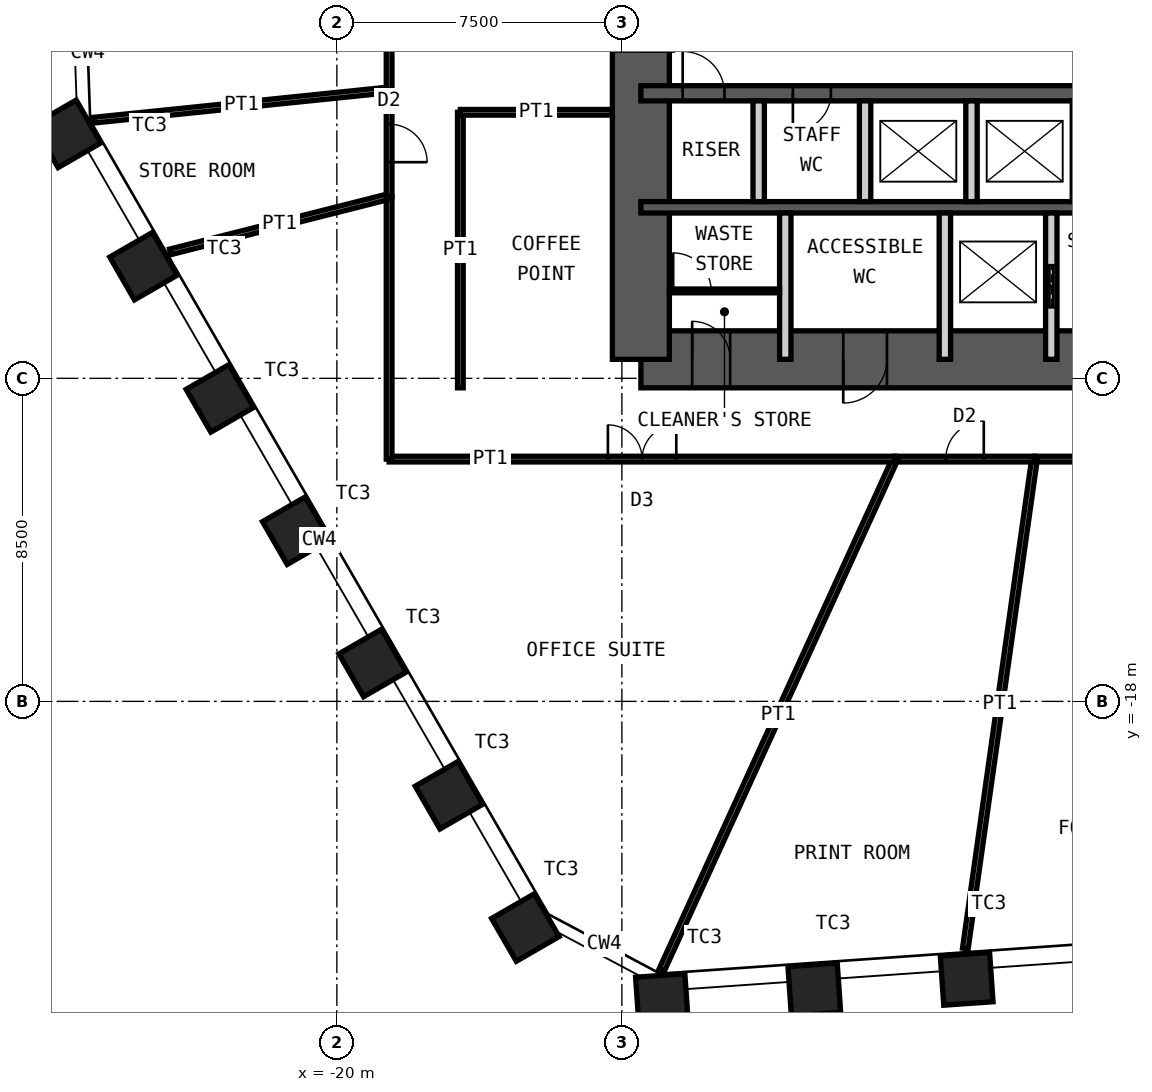
"""IFC4 building model, lengths in metres.
Left out: names, types, materials, properties, quantities, classifications, styles, units other than length and angle.
Written with IfcOpenShell. Run it as: python <this file> out.ifc"""

import sys

from ifc_helpers import new_model, si_unit, direction, frame, frame_2d, origin, origin_2d, place, context, subcontext, project, spatial, rectangle, hollow_rectangle, extrude, element, fill, save


model = new_model("IFC4")
c1 = context("Model", 3, precision=1e-05, world=origin(), true_north=direction((0.0, 1.0)))
c2 = subcontext(c1, "Body", "Model", "MODEL_VIEW")
j1 = project(units=[si_unit("LENGTHUNIT", "METRE"), si_unit("PLANEANGLEUNIT", "RADIAN")], contexts=[c1])
p1 = place(None, origin())
s1 = spatial("IfcSite", under=j1, at=p1, CompositionType="ELEMENT")
p2 = place(p1, origin())
s2 = spatial("IfcBuilding", under=s1, at=p2, CompositionType="ELEMENT")
p3 = place(p2, frame((0.0, 0.0, 119.8)))
s3 = spatial("IfcBuildingStorey", under=s2, at=p3, CompositionType="ELEMENT", Elevation=119.8)
for number, where, z_axis, x_axis in (
    (1, (-3.427, -25.301, 0.0), (0.0, 0.0, 1.0), (0.998, 0.07, 0.0)),
    (2, (-7.436, -25.581, 0.0), (0.0, 0.0, 1.0), (0.998, 0.07, 0.0)),
    (3, (-11.446, -25.861, 0.0), (0.0, 0.0, 1.0), (0.998, 0.07, 0.0)),
    (4, (-15.04, -23.95, 0.0), (0.0, 0.0, 1.0), (0.5, -0.866, 0.0)),
    (5, (-17.049, -20.47, 0.0), (0.0, 0.0, 1.0), (0.5, -0.866, 0.0)),
    (6, (-19.059, -16.989, 0.0), (0.0, 0.0, 1.0), (0.5, -0.866, 0.0)),
    (7, (-21.068, -13.509, 0.0), (0.0, 0.0, 1.0), (0.5, -0.866, 0.0)),
    (8, (-23.078, -10.028, 0.0), (0.0, 0.0, 1.0), (0.5, -0.866, 0.0)),
    (9, (-25.087, -6.547, 0.0), (0.0, 0.0, 1.0), (0.5, -0.866, 0.0)),
    (10, (-27.097, -3.067, 0.0), (0.0, 0.0, 1.0), (0.5, -0.866, 0.0)),
):
    element("IfcColumn", number, at=place(p3, frame(where, z_axis=z_axis, x_axis=x_axis)), inside=s3, PredefinedType="COLUMN", context=c2, shape_type="SweptSolid", body=[
        extrude(hollow_rectangle(XDim=1.3, YDim=1.3, WallThickness=0.1, at=origin_2d()), origin(), (0.0, 0.0, 1.0), 4.2),
    ])
p4 = place(p3, frame((-12.0, -9.0, 0.0), z_axis=(0.0, 0.0, 1.0), x_axis=(1.0, 0.0, 0.0)))
e11 = element("IfcWall", 11, at=p4, inside=s3, PredefinedType="SHEAR", context=c2, shape_type="SweptSolid", body=[
    extrude(rectangle(XDim=24.0, YDim=1.5, at=frame_2d((12.0, 0.0))), origin(), (0.0, 0.0, 1.0), 4.2),
])
p5 = place(p4, frame((1.35, 0.0, 0.0)))
e12 = element("IfcOpeningElement", 12, at=p5, cuts=e11, PredefinedType="OPENING", context=c2, shape_type="SweptSolid", body=[
    extrude(rectangle(XDim=1.0, YDim=2.1, at=frame_2d((0.5, 1.05))), frame((0.0, 0.76, 0.0), z_axis=(0.0, -1.0, 0.0), x_axis=(1.0, 0.0, 0.0)), (0.0, 0.0, 1.0), 1.52),
])
p6 = place(p4, frame((5.325, 0.0, 0.0)))
e13 = element("IfcOpeningElement", 13, at=p6, cuts=e11, PredefinedType="OPENING", context=c2, shape_type="SweptSolid", body=[
    extrude(rectangle(XDim=1.15, YDim=2.1, at=frame_2d((0.575, 1.05))), frame((0.0, 0.76, 0.0), z_axis=(0.0, -1.0, 0.0), x_axis=(1.0, 0.0, 0.0)), (0.0, 0.0, 1.0), 1.52),
])
p7 = place(p4, frame((12.6, 0.0, 0.0)))
e14 = element("IfcOpeningElement", 14, at=p7, cuts=e11, PredefinedType="OPENING", context=c2, shape_type="SweptSolid", body=[
    extrude(rectangle(XDim=1.0, YDim=2.1, at=frame_2d((0.5, 1.05))), frame((0.0, 0.76, 0.0), z_axis=(0.0, -1.0, 0.0), x_axis=(1.0, 0.0, 0.0)), (0.0, 0.0, 1.0), 1.52),
])
p8 = place(p3, frame((-12.0, -9.0, 0.0), z_axis=(0.0, 0.0, 1.0), x_axis=(0.0, 1.0, 0.0)))
e15 = element("IfcWall", 15, at=p8, inside=s3, PredefinedType="SHEAR", context=c2, shape_type="SweptSolid", body=[
    extrude(rectangle(XDim=18.0, YDim=1.5, at=frame_2d((9.0, 0.0))), origin(), (0.0, 0.0, 1.0), 4.2),
])
p9 = place(p8, frame((8.1, 0.0, 0.0)))
e16 = element("IfcOpeningElement", 16, at=p9, cuts=e15, PredefinedType="OPENING", context=c2, shape_type="SweptSolid", body=[
    extrude(rectangle(XDim=1.8, YDim=2.1, at=frame_2d((0.9, 1.05))), frame((0.0, 0.76, 0.0), z_axis=(0.0, -1.0, 0.0), x_axis=(1.0, 0.0, 0.0)), (0.0, 0.0, 1.0), 1.52),
])
p10 = place(p3, frame((-12.0, -2.0, 0.0), z_axis=(0.0, 0.0, 1.0), x_axis=(1.0, 0.0, 0.0)))
e17 = element("IfcWall", 17, at=p10, inside=s3, PredefinedType="SHEAR", context=c2, shape_type="SweptSolid", body=[
    extrude(rectangle(XDim=24.0, YDim=0.4, at=frame_2d((12.0, 0.0))), origin(), (0.0, 0.0, 1.0), 4.2),
])
p11 = place(p10, frame((1.1, 0.0, 0.0)))
e18 = element("IfcOpeningElement", 18, at=p11, cuts=e17, PredefinedType="OPENING", context=c2, shape_type="SweptSolid", body=[
    extrude(rectangle(XDim=1.1, YDim=2.1, at=frame_2d((0.55, 1.05))), frame((0.0, 0.21, 0.0), z_axis=(0.0, -1.0, 0.0), x_axis=(1.0, 0.0, 0.0)), (0.0, 0.0, 1.0), 0.42),
])
p12 = place(p10, frame((13.55, 0.0, 0.0)))
e19 = element("IfcOpeningElement", 19, at=p12, cuts=e17, PredefinedType="OPENING", context=c2, shape_type="SweptSolid", body=[
    extrude(rectangle(XDim=1.1, YDim=2.1, at=frame_2d((0.55, 1.05))), frame((0.0, 0.21, 0.0), z_axis=(0.0, -1.0, 0.0), x_axis=(1.0, 0.0, 0.0)), (0.0, 0.0, 1.0), 0.42),
])
p13 = place(p10, frame((20.7, 0.0, 0.0)))
e20 = element("IfcOpeningElement", 20, at=p13, cuts=e17, PredefinedType="OPENING", context=c2, shape_type="SweptSolid", body=[
    extrude(rectangle(XDim=1.1, YDim=2.1, at=frame_2d((0.55, 1.05))), frame((0.0, 0.21, 0.0), z_axis=(0.0, -1.0, 0.0), x_axis=(1.0, 0.0, 0.0)), (0.0, 0.0, 1.0), 0.42),
])
p14 = place(p10, frame((4.0, 0.0, 0.0)))
e21 = element("IfcOpeningElement", 21, at=p14, cuts=e17, PredefinedType="OPENING", context=c2, shape_type="SweptSolid", body=[
    extrude(rectangle(XDim=1.0, YDim=2.1, at=frame_2d((0.5, 1.05))), frame((0.0, 0.21, 0.0), z_axis=(0.0, -1.0, 0.0), x_axis=(1.0, 0.0, 0.0)), (0.0, 0.0, 1.0), 0.42),
])
p15 = place(p3, frame((-12.0, -5.0, 0.0), z_axis=(0.0, 0.0, 1.0), x_axis=(1.0, 0.0, 0.0)))
e22 = element("IfcWall", 22, at=p15, inside=s3, PredefinedType="SHEAR", context=c2, shape_type="SweptSolid", body=[
    extrude(rectangle(XDim=24.0, YDim=0.3, at=frame_2d((12.0, 0.0))), origin(), (0.0, 0.0, 1.0), 4.2),
])
for number, where, z_axis, x_axis in (
    (23, (-8.9, -4.85, 0.0), (0.0, 0.0, 1.0), (0.0, 1.0, 0.0)),
    (24, (-6.1, -4.85, 0.0), (0.0, 0.0, 1.0), (0.0, 1.0, 0.0)),
    (25, (-3.3, -4.85, 0.0), (0.0, 0.0, 1.0), (0.0, 1.0, 0.0)),
    (26, (-0.5, -4.85, 0.0), (0.0, 0.0, 1.0), (0.0, 1.0, 0.0)),
):
    element("IfcWall", number, at=place(p3, frame(where, z_axis=z_axis, x_axis=x_axis)), inside=s3, PredefinedType="PARTITIONING", context=c2, shape_type="SweptSolid", body=[
        extrude(rectangle(XDim=2.65, YDim=0.3, at=frame_2d((1.325, 0.0))), origin(), (0.0, 0.0, 1.0), 3.98),
    ])
for number, where, z_axis, x_axis in (
    (27, (-8.2, -9.0, 0.0), (0.0, 0.0, 1.0), (0.0, 1.0, 0.0)),
    (28, (-4.0, -9.0, 0.0), (0.0, 0.0, 1.0), (0.0, 1.0, 0.0)),
):
    element("IfcWall", number, at=place(p3, frame(where, z_axis=z_axis, x_axis=x_axis)), inside=s3, PredefinedType="PARTITIONING", context=c2, shape_type="SweptSolid", body=[
        extrude(rectangle(XDim=3.85, YDim=0.3, at=frame_2d((1.925, 0.0))), origin(), (0.0, 0.0, 1.0), 3.98),
    ])
p16 = place(p3, frame((-1.2, -9.0, 0.0), z_axis=(0.0, 0.0, 1.0), x_axis=(0.0, 1.0, 0.0)))
e29 = element("IfcWall", 29, at=p16, inside=s3, PredefinedType="PARTITIONING", context=c2, shape_type="SweptSolid", body=[
    extrude(rectangle(XDim=3.85, YDim=0.3, at=frame_2d((1.925, 0.0))), origin(), (0.0, 0.0, 1.0), 3.98),
])
p17 = place(p16, frame((1.375, 0.0, 0.0)))
e30 = element("IfcOpeningElement", 30, at=p17, cuts=e29, PredefinedType="OPENING", context=c2, shape_type="SweptSolid", body=[
    extrude(rectangle(XDim=1.1, YDim=2.4, at=frame_2d((0.55, 1.2))), frame((0.0, 0.16, 0.0), z_axis=(0.0, -1.0, 0.0), x_axis=(1.0, 0.0, 0.0)), (0.0, 0.0, 1.0), 0.32),
])
p18 = place(p3, frame((-11.25, -7.2, 0.0), z_axis=(0.0, 0.0, 1.0), x_axis=(1.0, 0.0, 0.0)))
e31 = element("IfcWall", 31, at=p18, inside=s3, PredefinedType="PARTITIONING", context=c2, shape_type="SweptSolid", body=[
    extrude(rectangle(XDim=2.9, YDim=0.1, at=frame_2d((1.45, 0.0))), origin(), (0.0, 0.0, 1.0), 3.98),
])
p19 = place(p18, frame((0.1, 0.0, 0.0)))
e32 = element("IfcOpeningElement", 32, at=p19, cuts=e31, PredefinedType="OPENING", context=c2, shape_type="SweptSolid", body=[
    extrude(rectangle(XDim=1.0, YDim=2.4, at=frame_2d((0.5, 1.2))), frame((0.0, 0.06, 0.0), z_axis=(0.0, -1.0, 0.0), x_axis=(1.0, 0.0, 0.0)), (0.0, 0.0, 1.0), 0.12),
])
p20 = place(p3, frame((2.197, -11.625, 0.0), z_axis=(0.0, 0.0, 1.0), x_axis=(-1.0, 0.0, 0.0)))
e33 = element("IfcWall", 33, at=p20, inside=s3, PredefinedType="PARTITIONING", context=c2, shape_type="SweptSolid", body=[
    extrude(rectangle(XDim=3.839, YDim=0.15, at=frame_2d((1.919, 0.0))), origin(), (0.0, 0.0, 1.0), 4.03),
])
p21 = place(p20, frame((1.419, 0.0, 0.0)))
e34 = element("IfcOpeningElement", 34, at=p21, cuts=e33, PredefinedType="OPENING", context=c2, shape_type="SweptSolid", body=[
    extrude(rectangle(XDim=1.0, YDim=2.4, at=frame_2d((0.5, 1.2))), frame((0.0, 0.085, 0.0), z_axis=(0.0, -1.0, 0.0), x_axis=(1.0, 0.0, 0.0)), (0.0, 0.0, 1.0), 0.17),
])
p22 = place(p3, frame((-3.462, -24.503, 0.0), z_axis=(0.0, 0.0, 1.0), x_axis=(0.139899618934, 0.990165691499, 0.0)))
e35 = element("IfcWall", 35, at=p22, inside=s3, PredefinedType="PARTITIONING", context=c2, shape_type="SweptSolid", body=[
    extrude(rectangle(XDim=13.006, YDim=0.15, at=frame_2d((6.503, 0.0))), origin(), (0.0, 0.0, 1.0), 3.33),
])
p23 = place(p3, frame((-1.642, -11.625, 0.0), z_axis=(0.0, 0.0, 1.0), x_axis=(-1.0, 0.0, 0.0)))
e36 = element("IfcWall", 36, at=p23, inside=s3, PredefinedType="PARTITIONING", context=c2, shape_type="SweptSolid", body=[
    extrude(rectangle(XDim=3.668, YDim=0.15, at=frame_2d((1.834, 0.0))), origin(), (0.0, 0.0, 1.0), 4.03),
])
p24 = place(p23, frame((1.334, 0.0, 0.0)))
e37 = element("IfcOpeningElement", 37, at=p24, cuts=e36, PredefinedType="OPENING", context=c2, shape_type="SweptSolid", body=[
    extrude(rectangle(XDim=1.0, YDim=2.4, at=frame_2d((0.5, 1.2))), frame((0.0, 0.085, 0.0), z_axis=(0.0, -1.0, 0.0), x_axis=(1.0, 0.0, 0.0)), (0.0, 0.0, 1.0), 0.17),
])
p25 = place(p3, frame((-11.453, -25.072, 0.0), z_axis=(0.0, 0.0, 1.0), x_axis=(0.415494357555, 0.909595755729, 0.0)))
e38 = element("IfcWall", 38, at=p25, inside=s3, PredefinedType="PARTITIONING", context=c2, shape_type="SweptSolid", body=[
    extrude(rectangle(XDim=14.784, YDim=0.15, at=frame_2d((7.392, 0.0))), origin(), (0.0, 0.0, 1.0), 2.93),
])
p26 = place(p3, frame((-5.31, -11.625, 0.0), z_axis=(0.0, 0.0, 1.0), x_axis=(-1.0, 0.0, 0.0)))
e39 = element("IfcWall", 39, at=p26, inside=s3, PredefinedType="PARTITIONING", context=c2, shape_type="SweptSolid", body=[
    extrude(rectangle(XDim=13.315, YDim=0.15, at=frame_2d((6.657, 0.0))), origin(), (0.0, 0.0, 1.0), 4.03),
])
p27 = place(p26, frame((5.757, 0.0, 0.0)))
e40 = element("IfcOpeningElement", 40, at=p27, cuts=e39, PredefinedType="OPENING", context=c2, shape_type="SweptSolid", body=[
    extrude(rectangle(XDim=1.8, YDim=2.4, at=frame_2d((0.9, 1.2))), frame((0.0, 0.085, 0.0), z_axis=(0.0, -1.0, 0.0), x_axis=(1.0, 0.0, 0.0)), (0.0, 0.0, 1.0), 0.17),
])
p28 = place(p3, frame((-18.625, -11.625, 0.0), z_axis=(0.0, 0.0, 1.0), x_axis=(0.0, 1.0, 0.0)))
e41 = element("IfcWall", 41, at=p28, inside=s3, PredefinedType="PARTITIONING", context=c2, shape_type="SweptSolid", body=[
    extrude(rectangle(XDim=6.91, YDim=0.15, at=frame_2d((3.455, 0.0))), origin(), (0.0, 0.0, 1.0), 4.03),
])
p29 = place(p3, frame((-24.384, -6.173, 0.0), z_axis=(0.0, 0.0, 1.0), x_axis=(0.969427635767, 0.245377380804, 0.0)))
e42 = element("IfcWall", 42, at=p29, inside=s3, PredefinedType="PARTITIONING", context=c2, shape_type="SweptSolid", body=[
    extrude(rectangle(XDim=5.941, YDim=0.15, at=frame_2d((2.97, 0.0))), origin(), (0.0, 0.0, 1.0), 3.33),
])
p30 = place(p3, frame((-18.625, -4.715, 0.0), z_axis=(0.0, 0.0, 1.0), x_axis=(0.0, 1.0, 0.0)))
e43 = element("IfcWall", 43, at=p30, inside=s3, PredefinedType="PARTITIONING", context=c2, shape_type="SweptSolid", body=[
    extrude(rectangle(XDim=2.805, YDim=0.15, at=frame_2d((1.402, 0.0))), origin(), (0.0, 0.0, 1.0), 4.03),
])
p31 = place(p30, frame((0.902, 0.0, 0.0)))
e44 = element("IfcOpeningElement", 44, at=p31, cuts=e43, PredefinedType="OPENING", context=c2, shape_type="SweptSolid", body=[
    extrude(rectangle(XDim=1.0, YDim=2.4, at=frame_2d((0.5, 1.2))), frame((0.0, 0.085, 0.0), z_axis=(0.0, -1.0, 0.0), x_axis=(1.0, 0.0, 0.0)), (0.0, 0.0, 1.0), 0.17),
])
p32 = place(p3, frame((-26.391, -2.706, 0.0), z_axis=(0.0, 0.0, 1.0), x_axis=(0.994783554373, 0.10200823471, 0.0)))
e45 = element("IfcWall", 45, at=p32, inside=s3, PredefinedType="PARTITIONING", context=c2, shape_type="SweptSolid", body=[
    extrude(rectangle(XDim=7.807, YDim=0.15, at=frame_2d((3.904, 0.0))), origin(), (0.0, 0.0, 1.0), 2.93),
])
p33 = place(p3, frame((-18.625, -1.91, 0.0), z_axis=(0.0, 0.0, 1.0), x_axis=(0.0, 1.0, 0.0)))
e46 = element("IfcWall", 46, at=p33, inside=s3, PredefinedType="PARTITIONING", context=c2, shape_type="SweptSolid", body=[
    extrude(rectangle(XDim=13.535, YDim=0.15, at=frame_2d((6.768, 0.0))), origin(), (0.0, 0.0, 1.0), 4.03),
])
p34 = place(p33, frame((5.867, 0.0, 0.0)))
e47 = element("IfcOpeningElement", 47, at=p34, cuts=e46, PredefinedType="OPENING", context=c2, shape_type="SweptSolid", body=[
    extrude(rectangle(XDim=1.8, YDim=2.4, at=frame_2d((0.9, 1.2))), frame((0.0, 0.085, 0.0), z_axis=(0.0, -1.0, 0.0), x_axis=(1.0, 0.0, 0.0)), (0.0, 0.0, 1.0), 0.17),
])
p35 = place(p3, frame((-16.75, -9.75, 0.0), z_axis=(0.0, 0.0, 1.0), x_axis=(0.0, 1.0, 0.0)))
e48 = element("IfcWall", 48, at=p35, inside=s3, PredefinedType="PARTITIONING", context=c2, shape_type="SweptSolid", body=[
    extrude(rectangle(XDim=7.25, YDim=0.15, at=frame_2d((3.625, 0.0))), origin(), (0.0, 0.0, 1.0), 4.03),
])
p36 = place(p3, frame((-12.75, -2.5, 0.0), z_axis=(0.0, 0.0, 1.0), x_axis=(-1.0, 0.0, 0.0)))
e49 = element("IfcWall", 49, at=p36, inside=s3, PredefinedType="PARTITIONING", context=c2, shape_type="SweptSolid", body=[
    extrude(rectangle(XDim=4.0, YDim=0.15, at=frame_2d((2.0, 0.0))), origin(), (0.0, 0.0, 1.0), 3.33),
])
p37 = place(p5, origin())
e50 = element("IfcDoor", 50, at=p37, inside=s3, OperationType="SINGLE_SWING_RIGHT", PredefinedType="DOOR", context=c2, shape_type="SweptSolid", body=[
    extrude(rectangle(XDim=1.0, YDim=2.1, at=frame_2d((0.5, 1.05))), frame((0.0, 0.025, 0.0), z_axis=(0.0, -1.0, 0.0), x_axis=(1.0, 0.0, 0.0)), (0.0, 0.0, 1.0), 0.05),
])
fill(e12, e50)
p38 = place(p6, origin())
e51 = element("IfcDoor", 51, at=p38, inside=s3, OperationType="SINGLE_SWING_LEFT", PredefinedType="DOOR", context=c2, shape_type="SweptSolid", body=[
    extrude(rectangle(XDim=1.15, YDim=2.1, at=frame_2d((0.575, 1.05))), frame((0.0, 0.025, 0.0), z_axis=(0.0, -1.0, 0.0), x_axis=(1.0, 0.0, 0.0)), (0.0, 0.0, 1.0), 0.05),
])
fill(e13, e51)
p39 = place(p11, origin())
e52 = element("IfcDoor", 52, at=p39, inside=s3, OperationType="SINGLE_SWING_RIGHT", PredefinedType="DOOR", context=c2, shape_type="SweptSolid", body=[
    extrude(rectangle(XDim=1.1, YDim=2.1, at=frame_2d((0.55, 1.05))), frame((0.0, 0.025, 0.0), z_axis=(0.0, -1.0, 0.0), x_axis=(1.0, 0.0, 0.0)), (0.0, 0.0, 1.0), 0.05),
])
fill(e18, e52)
p40 = place(p17, origin())
e53 = element("IfcDoor", 53, at=p40, inside=s3, OperationType="DOUBLE_DOOR_SLIDING", PredefinedType="DOOR", context=c2, shape_type="SweptSolid", body=[
    extrude(rectangle(XDim=1.1, YDim=2.4, at=frame_2d((0.55, 1.2))), frame((0.0, 0.025, 0.0), z_axis=(0.0, -1.0, 0.0), x_axis=(1.0, 0.0, 0.0)), (0.0, 0.0, 1.0), 0.05),
])
fill(e30, e53)
p41 = place(p14, origin())
e54 = element("IfcDoor", 54, at=p41, inside=s3, OperationType="SINGLE_SWING_LEFT", PredefinedType="DOOR", context=c2, shape_type="SweptSolid", body=[
    extrude(rectangle(XDim=1.0, YDim=2.1, at=frame_2d((0.5, 1.05))), frame((0.0, 0.025, 0.0), z_axis=(0.0, -1.0, 0.0), x_axis=(1.0, 0.0, 0.0)), (0.0, 0.0, 1.0), 0.05),
])
fill(e21, e54)
p42 = place(p19, origin())
e55 = element("IfcDoor", 55, at=p42, inside=s3, OperationType="SINGLE_SWING_RIGHT", PredefinedType="DOOR", context=c2, shape_type="SweptSolid", body=[
    extrude(rectangle(XDim=1.0, YDim=2.4, at=frame_2d((0.5, 1.2))), frame((0.0, 0.025, 0.0), z_axis=(0.0, -1.0, 0.0), x_axis=(1.0, 0.0, 0.0)), (0.0, 0.0, 1.0), 0.05),
])
fill(e32, e55)
p43 = place(p24, origin())
e56 = element("IfcDoor", 56, at=p43, inside=s3, OperationType="SINGLE_SWING_LEFT", PredefinedType="DOOR", context=c2, shape_type="SweptSolid", body=[
    extrude(rectangle(XDim=1.0, YDim=2.4, at=frame_2d((0.5, 1.2))), frame((0.0, 0.025, 0.0), z_axis=(0.0, -1.0, 0.0), x_axis=(1.0, 0.0, 0.0)), (0.0, 0.0, 1.0), 0.05),
])
fill(e37, e56)
p44 = place(p27, origin())
e57 = element("IfcDoor", 57, at=p44, inside=s3, OperationType="DOUBLE_DOOR_DOUBLE_SWING", PredefinedType="DOOR", context=c2, shape_type="SweptSolid", body=[
    extrude(rectangle(XDim=1.8, YDim=2.4, at=frame_2d((0.9, 1.2))), frame((0.0, 0.025, 0.0), z_axis=(0.0, -1.0, 0.0), x_axis=(1.0, 0.0, 0.0)), (0.0, 0.0, 1.0), 0.05),
])
fill(e40, e57)
p45 = place(p31, origin())
e58 = element("IfcDoor", 58, at=p45, inside=s3, OperationType="SINGLE_SWING_LEFT", PredefinedType="DOOR", context=c2, shape_type="SweptSolid", body=[
    extrude(rectangle(XDim=1.0, YDim=2.4, at=frame_2d((0.5, 1.2))), frame((0.0, 0.025, 0.0), z_axis=(0.0, -1.0, 0.0), x_axis=(1.0, 0.0, 0.0)), (0.0, 0.0, 1.0), 0.05),
])
fill(e44, e58)
save(model, sys.argv[1])
